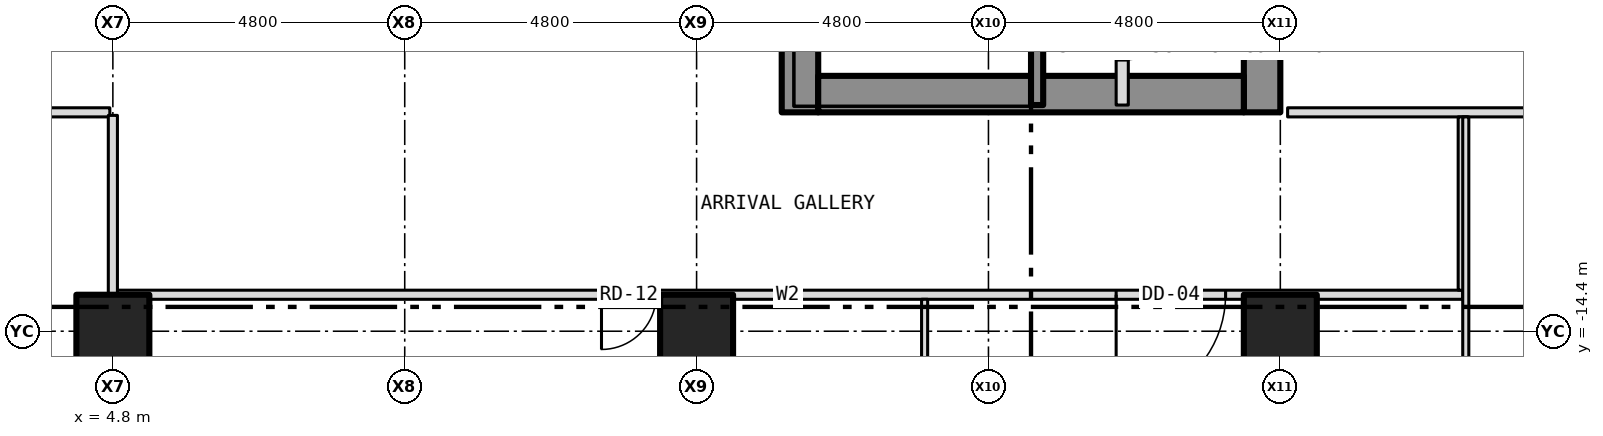
"""IFC4 building model, lengths in metres.
Left out: names, types, materials, properties, quantities, classifications, styles, units other than length and angle.
Written with IfcOpenShell. Run it as: python <this file> out.ifc"""

import sys

from ifc_helpers import new_model, si_unit, direction, frame, frame_2d, origin, origin_2d, place, context, subcontext, project, spatial, rectangle, hollow_rectangle, extrude, element, fill, save


model = new_model("IFC4")
c1 = context("Model", 3, precision=1e-05, world=origin(), true_north=direction((0.0, 1.0)))
c2 = subcontext(c1, "Body", "Model", "MODEL_VIEW")
j1 = project(units=[si_unit("LENGTHUNIT", "METRE"), si_unit("PLANEANGLEUNIT", "RADIAN")], contexts=[c1])
p1 = place(None, origin())
s1 = spatial("IfcSite", under=j1, at=p1, CompositionType="ELEMENT")
p2 = place(p1, origin())
s2 = spatial("IfcBuilding", under=s1, at=p2, CompositionType="ELEMENT")
p3 = place(p2, origin())
s3 = spatial("IfcBuildingStorey", under=s2, at=p3, CompositionType="ELEMENT", Elevation=0.0)
for number, where, z_axis, x_axis in (
    (1, (4.8, -14.4, -0.3), (0.0, 0.0, 1.0), (1.0, 0.0, 0.0)),
    (2, (14.4, -14.4, -0.3), (0.0, 0.0, 1.0), (1.0, 0.0, 0.0)),
    (3, (24.0, -14.4, -0.3), (0.0, 0.0, 1.0), (1.0, 0.0, 0.0)),
):
    element("IfcColumn", number, at=place(p3, frame(where, z_axis=z_axis, x_axis=x_axis)), inside=s3, PredefinedType="COLUMN", context=c2, shape_type="SweptSolid", body=[
        extrude(hollow_rectangle(XDim=1.2, YDim=1.2, WallThickness=0.07, at=origin_2d()), origin(), (0.0, 0.0, 1.0), 7.55),
    ])
p4 = place(p3, frame((16.1, -10.8, 0.0), z_axis=(0.0, 0.0, 1.0), x_axis=(0.0, 1.0, 0.0)))
e4 = element("IfcWall", 4, at=p4, inside=s3, PredefinedType="SHEAR", context=c2, shape_type="SweptSolid", body=[
    extrude(rectangle(XDim=21.6, YDim=0.6, at=frame_2d((10.8, 0.0))), origin(), (0.0, 0.0, 1.0), 7.2),
])
p5 = place(p4, frame((9.4, 0.0, 0.0)))
e5 = element("IfcOpeningElement", 5, at=p5, cuts=e4, PredefinedType="OPENING", context=c2, shape_type="SweptSolid", body=[
    extrude(rectangle(XDim=1.1, YDim=2.1, at=frame_2d((0.55, 1.05))), frame((0.0, 0.312, 0.0), z_axis=(0.0, -1.0, 0.0), x_axis=(1.0, 0.0, 0.0)), (0.0, 0.0, 1.0), 0.624),
])
p6 = place(p4, frame((11.5, 0.0, 0.0)))
e6 = element("IfcOpeningElement", 6, at=p6, cuts=e4, PredefinedType="OPENING", context=c2, shape_type="SweptSolid", body=[
    extrude(rectangle(XDim=1.1, YDim=2.1, at=frame_2d((0.55, 1.05))), frame((0.0, 0.312, 0.0), z_axis=(0.0, -1.0, 0.0), x_axis=(1.0, 0.0, 0.0)), (0.0, 0.0, 1.0), 0.624),
])
p7 = place(p4, frame((13.6, 0.0, 0.0)))
e7 = element("IfcOpeningElement", 7, at=p7, cuts=e4, PredefinedType="OPENING", context=c2, shape_type="SweptSolid", body=[
    extrude(rectangle(XDim=1.1, YDim=2.1, at=frame_2d((0.55, 1.05))), frame((0.0, 0.312, 0.0), z_axis=(0.0, -1.0, 0.0), x_axis=(1.0, 0.0, 0.0)), (0.0, 0.0, 1.0), 0.624),
])
p8 = place(p4, frame((15.7, 0.0, 0.0)))
e8 = element("IfcOpeningElement", 8, at=p8, cuts=e4, PredefinedType="OPENING", context=c2, shape_type="SweptSolid", body=[
    extrude(rectangle(XDim=1.1, YDim=2.1, at=frame_2d((0.55, 1.05))), frame((0.0, 0.312, 0.0), z_axis=(0.0, -1.0, 0.0), x_axis=(1.0, 0.0, 0.0)), (0.0, 0.0, 1.0), 0.624),
])
p9 = place(p4, frame((17.8, 0.0, 0.0)))
e9 = element("IfcOpeningElement", 9, at=p9, cuts=e4, PredefinedType="OPENING", context=c2, shape_type="SweptSolid", body=[
    extrude(rectangle(XDim=1.1, YDim=2.1, at=frame_2d((0.55, 1.05))), frame((0.0, 0.312, 0.0), z_axis=(0.0, -1.0, 0.0), x_axis=(1.0, 0.0, 0.0)), (0.0, 0.0, 1.0), 0.624),
])
p10 = place(p4, frame((19.9, 0.0, 0.0)))
e10 = element("IfcOpeningElement", 10, at=p10, cuts=e4, PredefinedType="OPENING", context=c2, shape_type="SweptSolid", body=[
    extrude(rectangle(XDim=1.1, YDim=2.1, at=frame_2d((0.55, 1.05))), frame((0.0, 0.312, 0.0), z_axis=(0.0, -1.0, 0.0), x_axis=(1.0, 0.0, 0.0)), (0.0, 0.0, 1.0), 0.624),
])
p11 = place(p3, frame((23.7, -10.8, 0.0), z_axis=(0.0, 0.0, 1.0), x_axis=(0.0, 1.0, 0.0)))
e11 = element("IfcWall", 11, at=p11, inside=s3, PredefinedType="SHEAR", context=c2, shape_type="SweptSolid", body=[
    extrude(rectangle(XDim=21.6, YDim=0.6, at=frame_2d((10.8, 0.0))), origin(), (0.0, 0.0, 1.0), 7.2),
])
p12 = place(p3, frame((16.4, -10.5, 0.0), z_axis=(0.0, 0.0, 1.0), x_axis=(1.0, 0.0, 0.0)))
e12 = element("IfcWall", 12, at=p12, inside=s3, PredefinedType="SHEAR", context=c2, shape_type="SweptSolid", body=[
    extrude(rectangle(XDim=7.0, YDim=0.6, at=frame_2d((3.5, 0.0))), origin(), (0.0, 0.0, 1.0), 7.2),
])
p13 = place(p3, frame((4.8, -13.8, 0.0), z_axis=(0.0, 0.0, 1.0), x_axis=(1.0, 0.0, 0.0)))
e13 = element("IfcWall", 13, at=p13, inside=s3, PredefinedType="PARTITIONING", context=c2, shape_type="SweptSolid", body=[
    extrude(rectangle(XDim=22.2, YDim=0.15, at=frame_2d((11.1, 0.0))), origin(), (0.0, 0.0, 1.0), 7.25),
])
p14 = place(p13, frame((8.036, 0.0, 0.0)))
e14 = element("IfcOpeningElement", 14, at=p14, cuts=e13, PredefinedType="OPENING", context=c2, shape_type="SweptSolid", body=[
    extrude(rectangle(XDim=0.9, YDim=2.1, at=frame_2d((0.45, 1.05))), frame((0.0, 0.087, 0.0), z_axis=(0.0, -1.0, 0.0), x_axis=(1.0, 0.0, 0.0)), (0.0, 0.0, 1.0), 0.174),
])
p15 = place(p13, frame((16.5, 0.0, 0.0)))
e15 = element("IfcOpeningElement", 15, at=p15, cuts=e13, PredefinedType="OPENING", context=c2, shape_type="SweptSolid", body=[
    extrude(rectangle(XDim=1.8, YDim=2.1, at=frame_2d((0.9, 1.05))), frame((0.0, 0.087, 0.0), z_axis=(0.0, -1.0, 0.0), x_axis=(1.0, 0.0, 0.0)), (0.0, 0.0, 1.0), 0.174),
])
p16 = place(p3, frame((-4.75, -10.8, 0.0), z_axis=(0.0, 0.0, 1.0), x_axis=(1.0, 0.0, 0.0)))
e16 = element("IfcWall", 16, at=p16, inside=s3, PredefinedType="PARTITIONING", context=c2, shape_type="SweptSolid", body=[
    extrude(rectangle(XDim=9.5, YDim=0.15, at=frame_2d((4.75, 0.0))), origin(), (0.0, 0.0, 1.0), 7.25),
])
p17 = place(p16, frame((3.85, 0.0, 0.0)))
e17 = element("IfcOpeningElement", 17, at=p17, cuts=e16, PredefinedType="OPENING", context=c2, shape_type="SweptSolid", body=[
    extrude(rectangle(XDim=1.8, YDim=2.1, at=frame_2d((0.9, 1.05))), frame((0.0, 0.087, 0.0), z_axis=(0.0, -1.0, 0.0), x_axis=(1.0, 0.0, 0.0)), (0.0, 0.0, 1.0), 0.174),
])
p18 = place(p3, frame((24.12, -10.8, 0.0), z_axis=(0.0, 0.0, 1.0), x_axis=(1.0, 0.0, 0.0)))
e18 = element("IfcWall", 18, at=p18, inside=s3, PredefinedType="PARTITIONING", context=c2, shape_type="SweptSolid", body=[
    extrude(rectangle(XDim=12.78, YDim=0.15, at=frame_2d((6.39, 0.0))), origin(), (0.0, 0.0, 1.0), 7.25),
])
p19 = place(p3, frame((4.8, -15.0, 0.0), z_axis=(0.0, 0.0, 1.0), x_axis=(0.0, 1.0, 0.0)))
e19 = element("IfcWall", 19, at=p19, inside=s3, PredefinedType="PARTITIONING", context=c2, shape_type="SweptSolid", body=[
    extrude(rectangle(XDim=1.2, YDim=0.15, at=frame_2d((0.6, 0.0))), origin(), (0.0, 0.0, 1.0), 7.25),
])
p20 = place(p3, frame((4.8, -13.8, 0.0), z_axis=(0.0, 0.0, 1.0), x_axis=(0.0, 1.0, 0.0)))
e20 = element("IfcWall", 20, at=p20, inside=s3, PredefinedType="PARTITIONING", context=c2, shape_type="SweptSolid", body=[
    extrude(rectangle(XDim=2.95, YDim=0.15, at=frame_2d((1.475, 0.0))), origin(), (0.0, 0.0, 1.0), 6.323),
])
p21 = place(p3, frame((18.15, -24.63, 0.0), z_axis=(0.0, 0.0, 1.0), x_axis=(0.0, 1.0, 0.0)))
e21 = element("IfcWall", 21, at=p21, inside=s3, PredefinedType="PARTITIONING", context=c2, shape_type="SweptSolid", body=[
    extrude(rectangle(XDim=10.755, YDim=0.1, at=frame_2d((5.377, 0.0))), origin(), (0.0, 0.0, 1.0), 7.25),
])
p22 = place(p3, frame((20.0, -10.68, 0.0), z_axis=(0.0, 0.0, 1.0), x_axis=(0.0, 1.0, 0.0)))
e22 = element("IfcWall", 22, at=p22, inside=s3, PredefinedType="SHEAR", context=c2, shape_type="SweptSolid", body=[
    extrude(rectangle(XDim=6.98, YDim=0.2, at=frame_2d((3.49, 0.0))), origin(), (0.0, 0.0, 1.0), 7.2),
])
p23 = place(p22, frame((2.93, 0.0, 0.0)))
e23 = element("IfcOpeningElement", 23, at=p23, cuts=e22, PredefinedType="OPENING", context=c2, shape_type="SweptSolid", body=[
    extrude(rectangle(XDim=1.1, YDim=2.1, at=frame_2d((0.55, 1.05))), frame((0.0, 0.112, 0.0), z_axis=(0.0, -1.0, 0.0), x_axis=(1.0, 0.0, 0.0)), (0.0, 0.0, 1.0), 0.224),
])
p24 = place(p3, frame((21.4, -10.68, 0.0), z_axis=(0.0, 0.0, 1.0), x_axis=(0.0, 1.0, 0.0)))
e24 = element("IfcWall", 24, at=p24, inside=s3, PredefinedType="PARTITIONING", context=c2, shape_type="SweptSolid", body=[
    extrude(rectangle(XDim=8.68, YDim=0.2, at=frame_2d((4.34, 0.0))), origin(), (0.0, 0.0, 1.0), 7.2),
])
p25 = place(p24, frame((5.66, 0.0, 0.0)))
e25 = element("IfcOpeningElement", 25, at=p25, cuts=e24, PredefinedType="OPENING", context=c2, shape_type="SweptSolid", body=[
    extrude(rectangle(XDim=0.9, YDim=2.1, at=frame_2d((0.45, 1.05))), frame((0.0, 0.112, 0.0), z_axis=(0.0, -1.0, 0.0), x_axis=(1.0, 0.0, 0.0)), (0.0, 0.0, 1.0), 0.224),
])
p26 = place(p24, frame((0.74, 0.0, 0.0)))
e26 = element("IfcOpeningElement", 26, at=p26, cuts=e24, PredefinedType="OPENING", context=c2, shape_type="SweptSolid", body=[
    extrude(rectangle(XDim=1.1, YDim=2.1, at=frame_2d((0.55, 1.05))), frame((0.0, 0.112, 0.0), z_axis=(0.0, -1.0, 0.0), x_axis=(1.0, 0.0, 0.0)), (0.0, 0.0, 1.0), 0.224),
])
p27 = place(p3, frame((27.0, -13.725, 0.0), z_axis=(0.0, 0.0, 1.0), x_axis=(0.0, 1.0, 0.0)))
e27 = element("IfcWall", 27, at=p27, inside=s3, PredefinedType="PARTITIONING", context=c2, shape_type="SweptSolid", body=[
    extrude(rectangle(XDim=2.85, YDim=0.15, at=frame_2d((1.425, 0.0))), origin(), (0.0, 0.0, 1.0), 7.25),
])
p28 = place(p3, frame((27.05, -20.75, 0.0), z_axis=(0.0, 0.0, 1.0), x_axis=(0.0, 1.0, 0.0)))
e28 = element("IfcWall", 28, at=p28, inside=s3, PredefinedType="PARTITIONING", context=c2, shape_type="SweptSolid", body=[
    extrude(rectangle(XDim=9.875, YDim=0.1, at=frame_2d((4.938, 0.0))), origin(), (0.0, 0.0, 1.0), 7.25),
])
p29 = place(p28, frame((4.05, 0.0, 0.0)))
e29 = element("IfcOpeningElement", 29, at=p29, cuts=e28, PredefinedType="OPENING", context=c2, shape_type="SweptSolid", body=[
    extrude(rectangle(XDim=1.8, YDim=2.1, at=frame_2d((0.9, 1.05))), frame((0.0, 0.062, 0.0), z_axis=(0.0, -1.0, 0.0), x_axis=(1.0, 0.0, 0.0)), (0.0, 0.0, 1.0), 0.124),
])
p30 = place(p26, origin())
e30 = element("IfcDoor", 30, at=p30, inside=s3, OperationType="SINGLE_SWING_RIGHT", PredefinedType="DOOR", context=c2, shape_type="SweptSolid", body=[
    extrude(rectangle(XDim=1.1, YDim=2.1, at=frame_2d((0.55, 1.05))), frame((0.0, 0.025, 0.0), z_axis=(0.0, -1.0, 0.0), x_axis=(1.0, 0.0, 0.0)), (0.0, 0.0, 1.0), 0.05),
])
fill(e26, e30)
p31 = place(p14, origin())
e31 = element("IfcDoor", 31, at=p31, inside=s3, OperationType="SINGLE_SWING_LEFT", PredefinedType="DOOR", context=c2, shape_type="SweptSolid", body=[
    extrude(rectangle(XDim=0.9, YDim=2.1, at=frame_2d((0.45, 1.05))), frame((0.0, 0.025, 0.0), z_axis=(0.0, -1.0, 0.0), x_axis=(1.0, 0.0, 0.0)), (0.0, 0.0, 1.0), 0.05),
])
fill(e14, e31)
p32 = place(p15, origin())
e32 = element("IfcDoor", 32, at=p32, inside=s3, OperationType="DOUBLE_DOOR_SINGLE_SWING", PredefinedType="DOOR", context=c2, shape_type="SweptSolid", body=[
    extrude(rectangle(XDim=1.8, YDim=2.1, at=frame_2d((0.9, 1.05))), frame((0.0, 0.025, 0.0), z_axis=(0.0, -1.0, 0.0), x_axis=(1.0, 0.0, 0.0)), (0.0, 0.0, 1.0), 0.05),
])
fill(e15, e32)
save(model, sys.argv[1])
